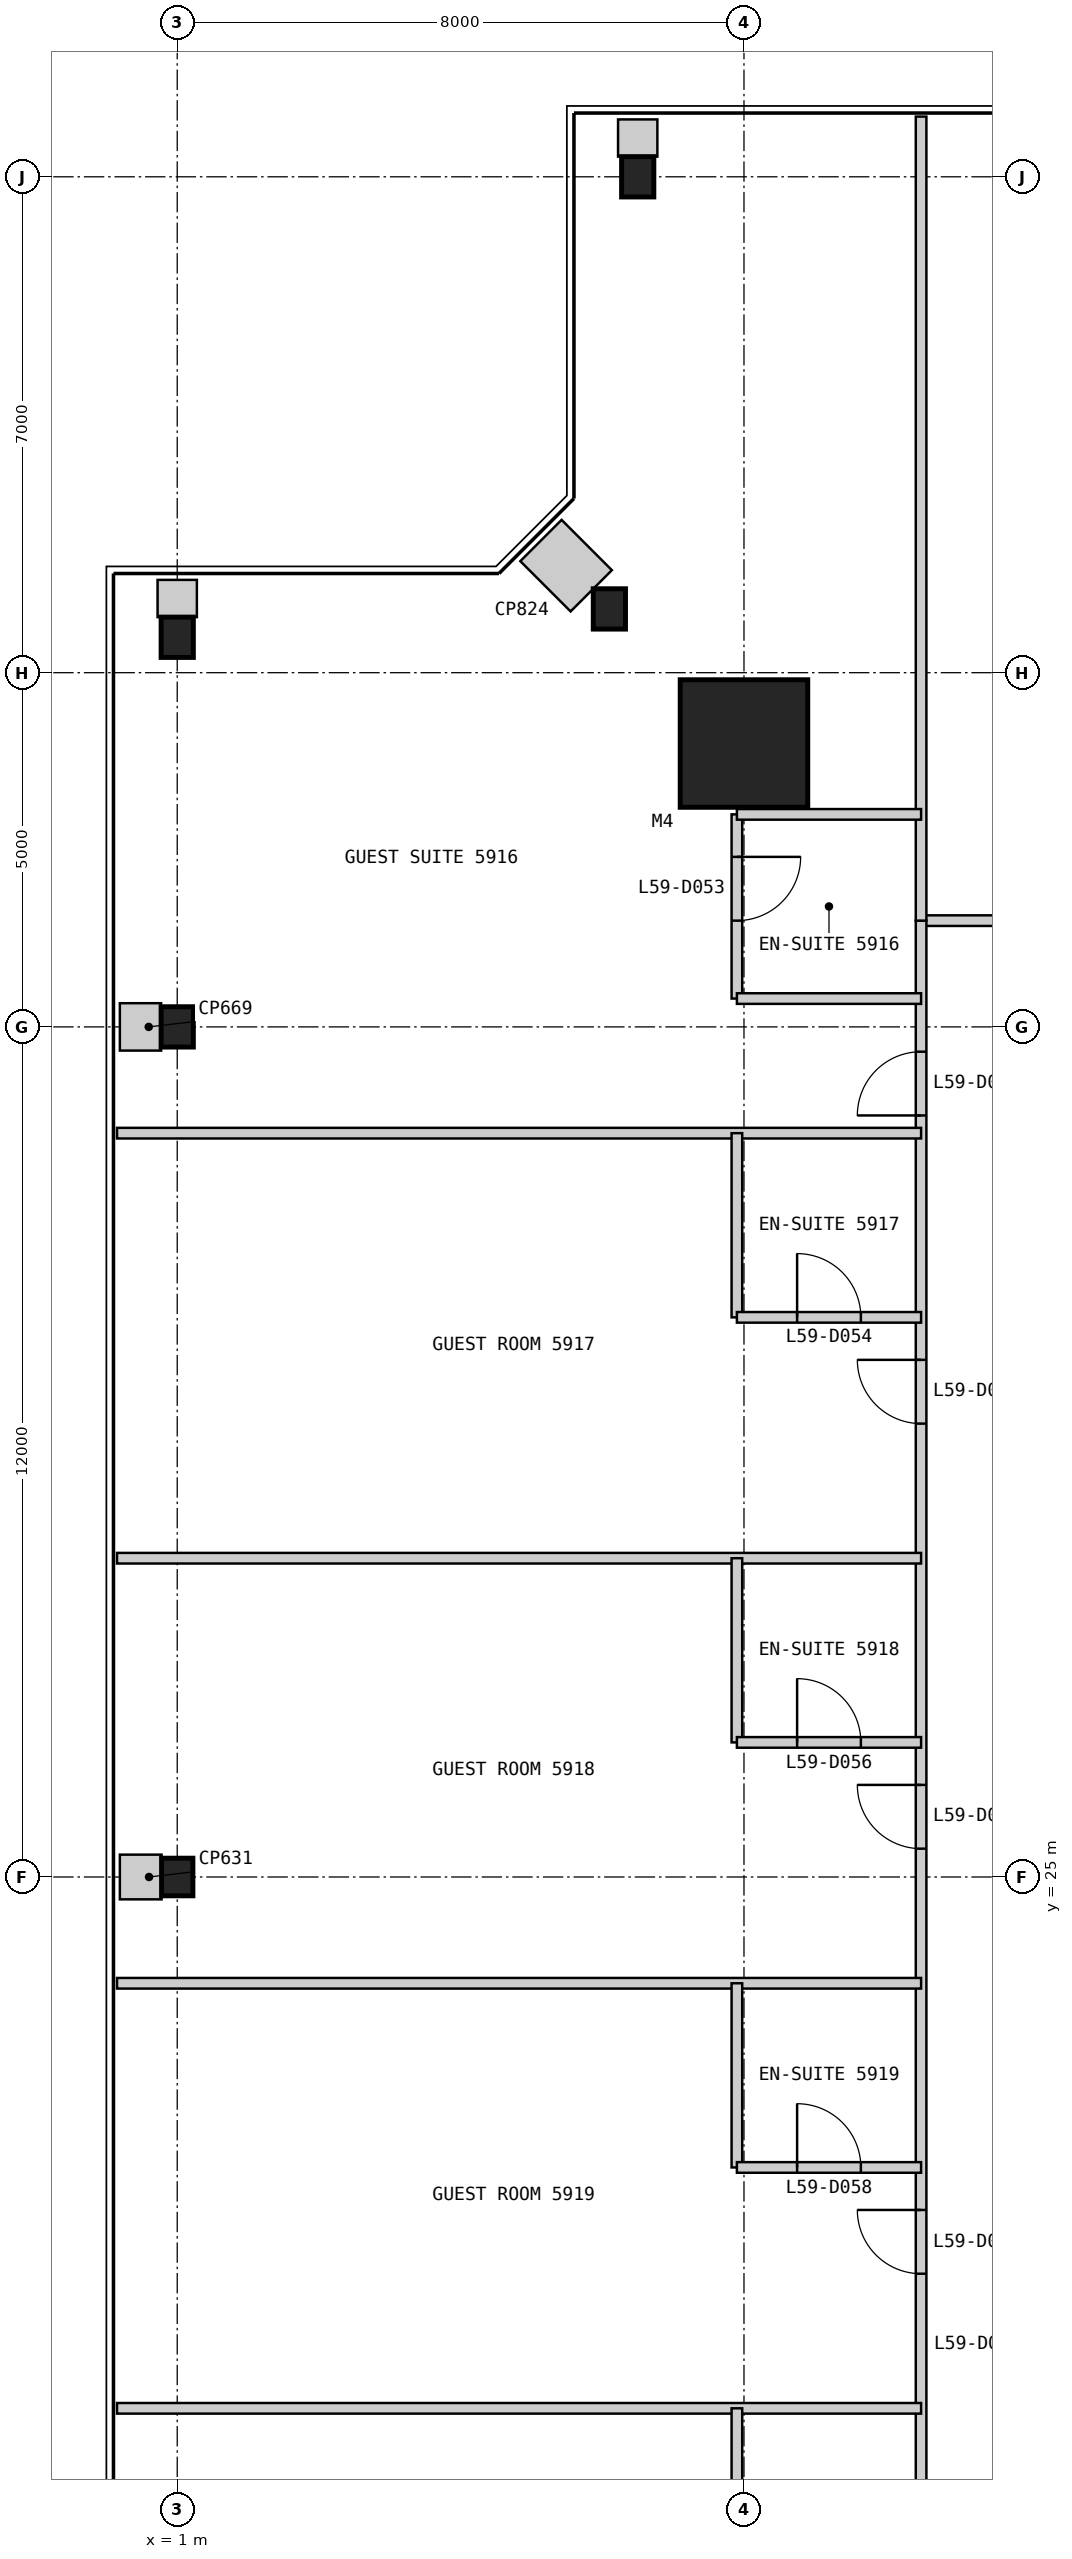
"""IFC4 building model, lengths in metres.
Left out: names, types, materials, properties, quantities, classifications, styles, units other than length and angle.
Written with IfcOpenShell. Run it as: python <this file> out.ifc"""

import sys

from ifc_helpers import new_model, si_unit, direction, frame, frame_2d, origin, origin_2d, place, context, subcontext, project, spatial, rectangle, i_section, extrude, element, fill, save


model = new_model("IFC4")
c1 = context("Model", 3, precision=1e-05, world=origin(), true_north=direction((0.0, 1.0)))
c2 = subcontext(c1, "Body", "Model", "MODEL_VIEW")
j1 = project(units=[si_unit("LENGTHUNIT", "METRE"), si_unit("PLANEANGLEUNIT", "RADIAN")], contexts=[c1])
p1 = place(None, origin())
s1 = spatial("IfcSite", under=j1, at=p1, CompositionType="ELEMENT")
p2 = place(p1, origin())
s2 = spatial("IfcBuilding", under=s1, at=p2, CompositionType="ELEMENT")
p3 = place(p2, frame((0.0, 0.0, 252.6)))
s3 = spatial("IfcBuildingStorey", under=s2, at=p3, CompositionType="ELEMENT", Elevation=252.6)
p4 = place(p3, frame((9.0, 41.0, 0.0), z_axis=(0.0, 0.0, 1.0), x_axis=(1.0, 0.0, 0.0)))
e1 = element("IfcColumn", 1, at=p4, inside=s3, PredefinedType="COLUMN", context=c2, shape_type="SweptSolid", body=[
    extrude(rectangle(XDim=1.8, YDim=1.8, at=origin_2d()), origin(), (0.0, 0.0, 1.0), 3.4),
])
for number, where, z_axis, x_axis in (
    (2, (7.5, 49.0, 0.0), (0.0, 0.0, 1.0), (1.0, 0.0, 0.0)),
    (3, (7.1, 42.9, 0.0), (0.0, 0.0, 1.0), (1.0, 0.0, 0.0)),
    (4, (1.0, 42.5, 0.0), (0.0, 0.0, 1.0), (1.0, 0.0, 0.0)),
    (5, (1.0, 37.0, 0.0), (0.0, 0.0, 1.0), (1.0, 0.0, 0.0)),
):
    element("IfcColumn", number, at=place(p3, frame(where, z_axis=z_axis, x_axis=x_axis)), inside=s3, PredefinedType="COLUMN", context=c2, shape_type="SweptSolid", body=[
        extrude(i_section(OverallWidth=0.455, OverallDepth=0.569, WebThickness=0.078, FlangeThickness=0.125, at=origin_2d()), origin(), (0.0, 0.0, 1.0), 3.4),
    ])
p5 = place(p3, frame((1.0, 25.0, 0.0), z_axis=(0.0, 0.0, 1.0), x_axis=(1.0, 0.0, 0.0)))
e6 = element("IfcColumn", 6, at=p5, inside=s3, PredefinedType="COLUMN", context=c2, shape_type="SweptSolid", body=[
    extrude(i_section(OverallWidth=0.442, OverallDepth=0.531, WebThickness=0.066, FlangeThickness=0.106, at=origin_2d()), origin(), (0.0, 0.0, 1.0), 3.4),
])
p6 = place(p3, frame((38.5, 38.5, 0.0), z_axis=(0.0, 0.0, 1.0), x_axis=(-1.0, 0.0, 0.0)))
e7 = element("IfcWall", 7, at=p6, inside=s3, PredefinedType="PARTITIONING", context=c2, shape_type="SweptSolid", body=[
    extrude(rectangle(XDim=27.0, YDim=0.15, at=frame_2d((13.5, 0.0))), origin(), (0.0, 0.0, 1.0), 3.25),
])
p7 = place(p6, frame((1.85, 0.0, 0.0)))
e8 = element("IfcOpeningElement", 8, at=p7, cuts=e7, PredefinedType="OPENING", context=c2, shape_type="SweptSolid", body=[
    extrude(rectangle(XDim=0.9, YDim=2.1, at=frame_2d((0.45, 1.05))), frame((0.0, 0.085, 0.0), z_axis=(0.0, -1.0, 0.0), x_axis=(1.0, 0.0, 0.0)), (0.0, 0.0, 1.0), 0.17),
])
p8 = place(p6, frame((6.2, 0.0, 0.0)))
e9 = element("IfcOpeningElement", 9, at=p8, cuts=e7, PredefinedType="OPENING", context=c2, shape_type="SweptSolid", body=[
    extrude(rectangle(XDim=0.9, YDim=2.1, at=frame_2d((0.45, 1.05))), frame((0.0, 0.085, 0.0), z_axis=(0.0, -1.0, 0.0), x_axis=(1.0, 0.0, 0.0)), (0.0, 0.0, 1.0), 0.17),
])
p9 = place(p6, frame((12.8, 0.0, 0.0)))
e10 = element("IfcOpeningElement", 10, at=p9, cuts=e7, PredefinedType="OPENING", context=c2, shape_type="SweptSolid", body=[
    extrude(rectangle(XDim=1.0, YDim=2.1, at=frame_2d((0.5, 1.05))), frame((0.0, 0.085, 0.0), z_axis=(0.0, -1.0, 0.0), x_axis=(1.0, 0.0, 0.0)), (0.0, 0.0, 1.0), 0.17),
])
p10 = place(p6, frame((18.2, 0.0, 0.0)))
e11 = element("IfcOpeningElement", 11, at=p10, cuts=e7, PredefinedType="OPENING", context=c2, shape_type="SweptSolid", body=[
    extrude(rectangle(XDim=0.9, YDim=2.1, at=frame_2d((0.45, 1.05))), frame((0.0, 0.085, 0.0), z_axis=(0.0, -1.0, 0.0), x_axis=(1.0, 0.0, 0.0)), (0.0, 0.0, 1.0), 0.17),
])
p11 = place(p6, frame((24.2, 0.0, 0.0)))
e12 = element("IfcOpeningElement", 12, at=p11, cuts=e7, PredefinedType="OPENING", context=c2, shape_type="SweptSolid", body=[
    extrude(rectangle(XDim=0.9, YDim=2.1, at=frame_2d((0.45, 1.05))), frame((0.0, 0.085, 0.0), z_axis=(0.0, -1.0, 0.0), x_axis=(1.0, 0.0, 0.0)), (0.0, 0.0, 1.0), 0.17),
])
p12 = place(p3, frame((11.5, 38.5, 0.0), z_axis=(0.0, 0.0, 1.0), x_axis=(0.0, -1.0, 0.0)))
e13 = element("IfcWall", 13, at=p12, inside=s3, PredefinedType="PARTITIONING", context=c2, shape_type="SweptSolid", body=[
    extrude(rectangle(XDim=27.0, YDim=0.15, at=frame_2d((13.5, 0.0))), origin(), (0.0, 0.0, 1.0), 3.25),
])
p13 = place(p12, frame((1.85, 0.0, 0.0)))
e14 = element("IfcOpeningElement", 14, at=p13, cuts=e13, PredefinedType="OPENING", context=c2, shape_type="SweptSolid", body=[
    extrude(rectangle(XDim=0.9, YDim=2.1, at=frame_2d((0.45, 1.05))), frame((0.0, 0.085, 0.0), z_axis=(0.0, -1.0, 0.0), x_axis=(1.0, 0.0, 0.0)), (0.0, 0.0, 1.0), 0.17),
])
p14 = place(p12, frame((6.2, 0.0, 0.0)))
e15 = element("IfcOpeningElement", 15, at=p14, cuts=e13, PredefinedType="OPENING", context=c2, shape_type="SweptSolid", body=[
    extrude(rectangle(XDim=0.9, YDim=2.1, at=frame_2d((0.45, 1.05))), frame((0.0, 0.085, 0.0), z_axis=(0.0, -1.0, 0.0), x_axis=(1.0, 0.0, 0.0)), (0.0, 0.0, 1.0), 0.17),
])
p15 = place(p12, frame((12.2, 0.0, 0.0)))
e16 = element("IfcOpeningElement", 16, at=p15, cuts=e13, PredefinedType="OPENING", context=c2, shape_type="SweptSolid", body=[
    extrude(rectangle(XDim=0.9, YDim=2.1, at=frame_2d((0.45, 1.05))), frame((0.0, 0.085, 0.0), z_axis=(0.0, -1.0, 0.0), x_axis=(1.0, 0.0, 0.0)), (0.0, 0.0, 1.0), 0.17),
])
p16 = place(p12, frame((18.2, 0.0, 0.0)))
e17 = element("IfcOpeningElement", 17, at=p16, cuts=e13, PredefinedType="OPENING", context=c2, shape_type="SweptSolid", body=[
    extrude(rectangle(XDim=0.9, YDim=2.1, at=frame_2d((0.45, 1.05))), frame((0.0, 0.085, 0.0), z_axis=(0.0, -1.0, 0.0), x_axis=(1.0, 0.0, 0.0)), (0.0, 0.0, 1.0), 0.17),
])
p17 = place(p12, frame((24.2, 0.0, 0.0)))
e18 = element("IfcOpeningElement", 18, at=p17, cuts=e13, PredefinedType="OPENING", context=c2, shape_type="SweptSolid", body=[
    extrude(rectangle(XDim=0.9, YDim=2.1, at=frame_2d((0.45, 1.05))), frame((0.0, 0.085, 0.0), z_axis=(0.0, -1.0, 0.0), x_axis=(1.0, 0.0, 0.0)), (0.0, 0.0, 1.0), 0.17),
])
p18 = place(p3, frame((11.5, 49.85, 0.0), z_axis=(0.0, 0.0, 1.0), x_axis=(0.0, -1.0, 0.0)))
e19 = element("IfcWall", 19, at=p18, inside=s3, PredefinedType="PARTITIONING", context=c2, shape_type="SweptSolid", body=[
    extrude(rectangle(XDim=11.35, YDim=0.15, at=frame_2d((5.675, 0.0))), origin(), (0.0, 0.0, 1.0), 3.25),
])
p19 = place(p3, frame((8.9, 40.0, 0.0), z_axis=(0.0, 0.0, 1.0), x_axis=(0.0, -1.0, 0.0)))
e20 = element("IfcWall", 20, at=p19, inside=s3, PredefinedType="PARTITIONING", context=c2, shape_type="SweptSolid", body=[
    extrude(rectangle(XDim=2.6, YDim=0.15, at=frame_2d((1.3, 0.0))), origin(), (0.0, 0.0, 1.0), 2.638),
])
p20 = place(p19, frame((0.6, 0.0, 0.0)))
e21 = element("IfcOpeningElement", 21, at=p20, cuts=e20, PredefinedType="OPENING", context=c2, shape_type="SweptSolid", body=[
    extrude(rectangle(XDim=0.9, YDim=2.1, at=frame_2d((0.45, 1.05))), frame((0.0, 0.085, 0.0), z_axis=(0.0, -1.0, 0.0), x_axis=(1.0, 0.0, 0.0)), (0.0, 0.0, 1.0), 0.17),
])
for number, where, z_axis, x_axis in (
    (22, (8.9, 40.0, 0.0), (0.0, 0.0, 1.0), (1.0, 0.0, 0.0)),
    (23, (8.9, 37.4, 0.0), (0.0, 0.0, 1.0), (1.0, 0.0, 0.0)),
):
    element("IfcWall", number, at=place(p3, frame(where, z_axis=z_axis, x_axis=x_axis)), inside=s3, PredefinedType="PARTITIONING", context=c2, shape_type="SweptSolid", body=[
        extrude(rectangle(XDim=2.6, YDim=0.15, at=frame_2d((1.3, 0.0))), origin(), (0.0, 0.0, 1.0), 3.25),
    ])
p21 = place(p3, frame((0.15, 35.5, 0.0), z_axis=(0.0, 0.0, 1.0), x_axis=(1.0, 0.0, 0.0)))
e24 = element("IfcWall", 24, at=p21, inside=s3, PredefinedType="PARTITIONING", context=c2, shape_type="SweptSolid", body=[
    extrude(rectangle(XDim=11.35, YDim=0.15, at=frame_2d((5.675, 0.0))), origin(), (0.0, 0.0, 1.0), 3.25),
])
p22 = place(p3, frame((8.9, 35.5, 0.0), z_axis=(0.0, 0.0, 1.0), x_axis=(0.0, -1.0, 0.0)))
e25 = element("IfcWall", 25, at=p22, inside=s3, PredefinedType="PARTITIONING", context=c2, shape_type="SweptSolid", body=[
    extrude(rectangle(XDim=2.6, YDim=0.15, at=frame_2d((1.3, 0.0))), origin(), (0.0, 0.0, 1.0), 3.25),
])
p23 = place(p3, frame((8.9, 32.9, 0.0), z_axis=(0.0, 0.0, 1.0), x_axis=(1.0, 0.0, 0.0)))
e26 = element("IfcWall", 26, at=p23, inside=s3, PredefinedType="PARTITIONING", context=c2, shape_type="SweptSolid", body=[
    extrude(rectangle(XDim=2.6, YDim=0.15, at=frame_2d((1.3, 0.0))), origin(), (0.0, 0.0, 1.0), 3.25),
])
p24 = place(p23, frame((0.85, 0.0, 0.0)))
e27 = element("IfcOpeningElement", 27, at=p24, cuts=e26, PredefinedType="OPENING", context=c2, shape_type="SweptSolid", body=[
    extrude(rectangle(XDim=0.9, YDim=2.1, at=frame_2d((0.45, 1.05))), frame((0.0, 0.085, 0.0), z_axis=(0.0, -1.0, 0.0), x_axis=(1.0, 0.0, 0.0)), (0.0, 0.0, 1.0), 0.17),
])
p25 = place(p3, frame((0.15, 29.5, 0.0), z_axis=(0.0, 0.0, 1.0), x_axis=(1.0, 0.0, 0.0)))
e28 = element("IfcWall", 28, at=p25, inside=s3, PredefinedType="PARTITIONING", context=c2, shape_type="SweptSolid", body=[
    extrude(rectangle(XDim=11.35, YDim=0.15, at=frame_2d((5.675, 0.0))), origin(), (0.0, 0.0, 1.0), 3.25),
])
p26 = place(p3, frame((8.9, 29.5, 0.0), z_axis=(0.0, 0.0, 1.0), x_axis=(0.0, -1.0, 0.0)))
e29 = element("IfcWall", 29, at=p26, inside=s3, PredefinedType="PARTITIONING", context=c2, shape_type="SweptSolid", body=[
    extrude(rectangle(XDim=2.6, YDim=0.15, at=frame_2d((1.3, 0.0))), origin(), (0.0, 0.0, 1.0), 3.25),
])
p27 = place(p3, frame((8.9, 26.9, 0.0), z_axis=(0.0, 0.0, 1.0), x_axis=(1.0, 0.0, 0.0)))
e30 = element("IfcWall", 30, at=p27, inside=s3, PredefinedType="PARTITIONING", context=c2, shape_type="SweptSolid", body=[
    extrude(rectangle(XDim=2.6, YDim=0.15, at=frame_2d((1.3, 0.0))), origin(), (0.0, 0.0, 1.0), 3.25),
])
p28 = place(p27, frame((0.85, 0.0, 0.0)))
e31 = element("IfcOpeningElement", 31, at=p28, cuts=e30, PredefinedType="OPENING", context=c2, shape_type="SweptSolid", body=[
    extrude(rectangle(XDim=0.9, YDim=2.1, at=frame_2d((0.45, 1.05))), frame((0.0, 0.085, 0.0), z_axis=(0.0, -1.0, 0.0), x_axis=(1.0, 0.0, 0.0)), (0.0, 0.0, 1.0), 0.17),
])
p29 = place(p3, frame((0.15, 23.5, 0.0), z_axis=(0.0, 0.0, 1.0), x_axis=(1.0, 0.0, 0.0)))
e32 = element("IfcWall", 32, at=p29, inside=s3, PredefinedType="PARTITIONING", context=c2, shape_type="SweptSolid", body=[
    extrude(rectangle(XDim=11.35, YDim=0.15, at=frame_2d((5.675, 0.0))), origin(), (0.0, 0.0, 1.0), 3.25),
])
p30 = place(p3, frame((8.9, 23.5, 0.0), z_axis=(0.0, 0.0, 1.0), x_axis=(0.0, -1.0, 0.0)))
e33 = element("IfcWall", 33, at=p30, inside=s3, PredefinedType="PARTITIONING", context=c2, shape_type="SweptSolid", body=[
    extrude(rectangle(XDim=2.6, YDim=0.15, at=frame_2d((1.3, 0.0))), origin(), (0.0, 0.0, 1.0), 3.25),
])
p31 = place(p3, frame((8.9, 20.9, 0.0), z_axis=(0.0, 0.0, 1.0), x_axis=(1.0, 0.0, 0.0)))
e34 = element("IfcWall", 34, at=p31, inside=s3, PredefinedType="PARTITIONING", context=c2, shape_type="SweptSolid", body=[
    extrude(rectangle(XDim=2.6, YDim=0.15, at=frame_2d((1.3, 0.0))), origin(), (0.0, 0.0, 1.0), 3.25),
])
p32 = place(p31, frame((0.85, 0.0, 0.0)))
e35 = element("IfcOpeningElement", 35, at=p32, cuts=e34, PredefinedType="OPENING", context=c2, shape_type="SweptSolid", body=[
    extrude(rectangle(XDim=0.9, YDim=2.1, at=frame_2d((0.45, 1.05))), frame((0.0, 0.085, 0.0), z_axis=(0.0, -1.0, 0.0), x_axis=(1.0, 0.0, 0.0)), (0.0, 0.0, 1.0), 0.17),
])
p33 = place(p3, frame((0.15, 17.5, 0.0), z_axis=(0.0, 0.0, 1.0), x_axis=(1.0, 0.0, 0.0)))
e36 = element("IfcWall", 36, at=p33, inside=s3, PredefinedType="PARTITIONING", context=c2, shape_type="SweptSolid", body=[
    extrude(rectangle(XDim=11.35, YDim=0.15, at=frame_2d((5.675, 0.0))), origin(), (0.0, 0.0, 1.0), 3.25),
])
p34 = place(p3, frame((8.9, 17.5, 0.0), z_axis=(0.0, 0.0, 1.0), x_axis=(0.0, -1.0, 0.0)))
e37 = element("IfcWall", 37, at=p34, inside=s3, PredefinedType="PARTITIONING", context=c2, shape_type="SweptSolid", body=[
    extrude(rectangle(XDim=2.6, YDim=0.15, at=frame_2d((1.3, 0.0))), origin(), (0.0, 0.0, 1.0), 3.25),
])
p35 = place(p3, frame((7.5, 49.81, 0.0), z_axis=(0.0, 0.0, 1.0), x_axis=(0.0, -1.0, 0.0)))
e38 = element("IfcWall", 38, at=p35, inside=s3, PredefinedType="PARTITIONING", context=c2, shape_type="SweptSolid", body=[
    extrude(rectangle(XDim=0.526, YDim=0.555, at=frame_2d((0.263, 0.0))), origin(), (0.0, 0.0, 1.0), 3.25),
])
p36 = place(p3, frame((6.134, 43.866, 0.0), z_axis=(0.0, 0.0, 1.0), x_axis=(0.707106781187, -0.707106781187, 0.0)))
e39 = element("IfcWall", 39, at=p36, inside=s3, PredefinedType="PARTITIONING", context=c2, shape_type="SweptSolid", body=[
    extrude(rectangle(XDim=1.004, YDim=0.824, at=frame_2d((0.502, 0.0))), origin(), (0.0, 0.0, 1.0), 3.25),
])
p37 = place(p3, frame((1.0, 43.31, 0.0), z_axis=(0.0, 0.0, 1.0), x_axis=(0.0, -1.0, 0.0)))
e40 = element("IfcWall", 40, at=p37, inside=s3, PredefinedType="PARTITIONING", context=c2, shape_type="SweptSolid", body=[
    extrude(rectangle(XDim=0.526, YDim=0.555, at=frame_2d((0.263, 0.0))), origin(), (0.0, 0.0, 1.0), 3.25),
])
p38 = place(p3, frame((0.19, 37.0, 0.0), z_axis=(0.0, 0.0, 1.0), x_axis=(1.0, 0.0, 0.0)))
e41 = element("IfcWall", 41, at=p38, inside=s3, PredefinedType="PARTITIONING", context=c2, shape_type="SweptSolid", body=[
    extrude(rectangle(XDim=0.583, YDim=0.669, at=frame_2d((0.292, 0.0))), origin(), (0.0, 0.0, 1.0), 3.25),
])
p39 = place(p3, frame((0.19, 25.0, 0.0), z_axis=(0.0, 0.0, 1.0), x_axis=(1.0, 0.0, 0.0)))
e42 = element("IfcWall", 42, at=p39, inside=s3, PredefinedType="PARTITIONING", context=c2, shape_type="SweptSolid", body=[
    extrude(rectangle(XDim=0.589, YDim=0.631, at=frame_2d((0.294, 0.0))), origin(), (0.0, 0.0, 1.0), 3.25),
])
p40 = place(p13, frame((0.9, 0.0, 0.0), z_axis=(0.0, 0.0, 1.0), x_axis=(-1.0, 0.0, 0.0)))
e43 = element("IfcDoor", 43, at=p40, inside=s3, OperationType="SINGLE_SWING_LEFT", PredefinedType="DOOR", context=c2, shape_type="SweptSolid", body=[
    extrude(rectangle(XDim=0.9, YDim=2.1, at=frame_2d((0.45, 1.05))), frame((0.0, 0.025, 0.0), z_axis=(0.0, -1.0, 0.0), x_axis=(1.0, 0.0, 0.0)), (0.0, 0.0, 1.0), 0.05),
])
fill(e14, e43)
p41 = place(p20, origin())
e44 = element("IfcDoor", 44, at=p41, inside=s3, OperationType="SINGLE_SWING_LEFT", PredefinedType="DOOR", context=c2, shape_type="SweptSolid", body=[
    extrude(rectangle(XDim=0.9, YDim=2.1, at=frame_2d((0.45, 1.05))), frame((0.0, 0.025, 0.0), z_axis=(0.0, -1.0, 0.0), x_axis=(1.0, 0.0, 0.0)), (0.0, 0.0, 1.0), 0.05),
])
fill(e21, e44)
p42 = place(p24, origin())
e45 = element("IfcDoor", 45, at=p42, inside=s3, OperationType="SINGLE_SWING_LEFT", PredefinedType="DOOR", context=c2, shape_type="SweptSolid", body=[
    extrude(rectangle(XDim=0.9, YDim=2.1, at=frame_2d((0.45, 1.05))), frame((0.0, 0.025, 0.0), z_axis=(0.0, -1.0, 0.0), x_axis=(1.0, 0.0, 0.0)), (0.0, 0.0, 1.0), 0.05),
])
fill(e27, e45)
p43 = place(p14, frame((0.9, 0.0, 0.0), z_axis=(0.0, 0.0, 1.0), x_axis=(-1.0, 0.0, 0.0)))
e46 = element("IfcDoor", 46, at=p43, inside=s3, OperationType="SINGLE_SWING_RIGHT", PredefinedType="DOOR", context=c2, shape_type="SweptSolid", body=[
    extrude(rectangle(XDim=0.9, YDim=2.1, at=frame_2d((0.45, 1.05))), frame((0.0, 0.025, 0.0), z_axis=(0.0, -1.0, 0.0), x_axis=(1.0, 0.0, 0.0)), (0.0, 0.0, 1.0), 0.05),
])
fill(e15, e46)
p44 = place(p28, origin())
e47 = element("IfcDoor", 47, at=p44, inside=s3, OperationType="SINGLE_SWING_LEFT", PredefinedType="DOOR", context=c2, shape_type="SweptSolid", body=[
    extrude(rectangle(XDim=0.9, YDim=2.1, at=frame_2d((0.45, 1.05))), frame((0.0, 0.025, 0.0), z_axis=(0.0, -1.0, 0.0), x_axis=(1.0, 0.0, 0.0)), (0.0, 0.0, 1.0), 0.05),
])
fill(e31, e47)
p45 = place(p15, frame((0.9, 0.0, 0.0), z_axis=(0.0, 0.0, 1.0), x_axis=(-1.0, 0.0, 0.0)))
e48 = element("IfcDoor", 48, at=p45, inside=s3, OperationType="SINGLE_SWING_RIGHT", PredefinedType="DOOR", context=c2, shape_type="SweptSolid", body=[
    extrude(rectangle(XDim=0.9, YDim=2.1, at=frame_2d((0.45, 1.05))), frame((0.0, 0.025, 0.0), z_axis=(0.0, -1.0, 0.0), x_axis=(1.0, 0.0, 0.0)), (0.0, 0.0, 1.0), 0.05),
])
fill(e16, e48)
p46 = place(p32, origin())
e49 = element("IfcDoor", 49, at=p46, inside=s3, OperationType="SINGLE_SWING_LEFT", PredefinedType="DOOR", context=c2, shape_type="SweptSolid", body=[
    extrude(rectangle(XDim=0.9, YDim=2.1, at=frame_2d((0.45, 1.05))), frame((0.0, 0.025, 0.0), z_axis=(0.0, -1.0, 0.0), x_axis=(1.0, 0.0, 0.0)), (0.0, 0.0, 1.0), 0.05),
])
fill(e35, e49)
p47 = place(p16, frame((0.9, 0.0, 0.0), z_axis=(0.0, 0.0, 1.0), x_axis=(-1.0, 0.0, 0.0)))
e50 = element("IfcDoor", 50, at=p47, inside=s3, OperationType="SINGLE_SWING_RIGHT", PredefinedType="DOOR", context=c2, shape_type="SweptSolid", body=[
    extrude(rectangle(XDim=0.9, YDim=2.1, at=frame_2d((0.45, 1.05))), frame((0.0, 0.025, 0.0), z_axis=(0.0, -1.0, 0.0), x_axis=(1.0, 0.0, 0.0)), (0.0, 0.0, 1.0), 0.05),
])
fill(e17, e50)
save(model, sys.argv[1])
